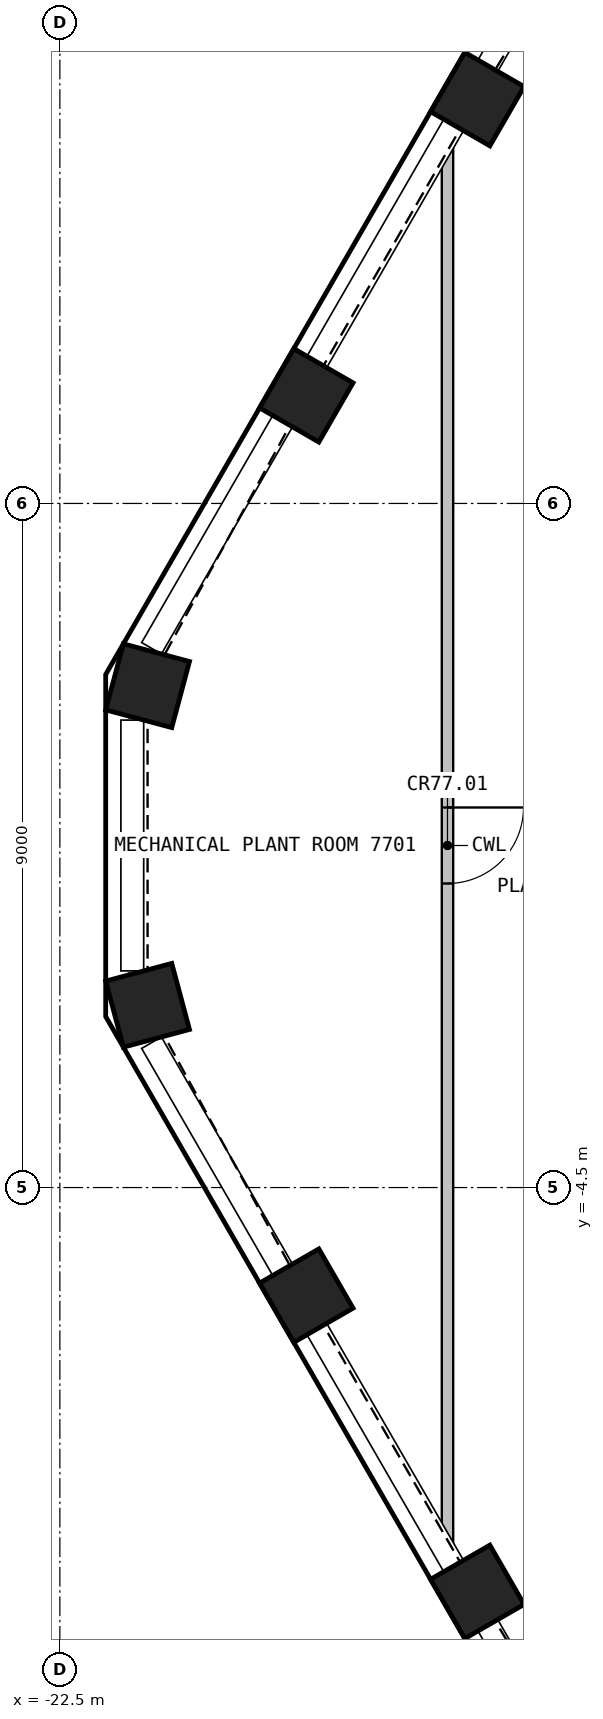
"""IFC4 building model, lengths in metres.
Left out: names, types, materials, properties, quantities, classifications, styles, units other than length and angle.
Written with IfcOpenShell. Run it as: python <this file> out.ifc"""

import sys

from ifc_helpers import new_model, si_unit, direction, frame, frame_2d, origin, origin_2d, place, context, subcontext, project, spatial, polyline, rectangle, outline, extrude, element, fill, save


model = new_model("IFC4")
c1 = context("Model", 3, precision=1e-05, world=origin(), true_north=direction((0.0, 1.0)))
c2 = subcontext(c1, "Body", "Model", "MODEL_VIEW")
j1 = project(units=[si_unit("LENGTHUNIT", "METRE"), si_unit("PLANEANGLEUNIT", "RADIAN")], contexts=[c1])
p1 = place(None, origin())
s1 = spatial("IfcSite", under=j1, at=p1, CompositionType="ELEMENT")
p2 = place(p1, origin())
s2 = spatial("IfcBuilding", under=s1, at=p2, CompositionType="ELEMENT")
p3 = place(p2, frame((0.0, 0.0, 309.9)))
s3 = spatial("IfcBuildingStorey", under=s2, at=p3, CompositionType="ELEMENT", Elevation=309.9)
for number, where, z_axis, x_axis in (
    (1, (-17.007, 9.819, 0.0), (0.0, 0.0, 1.0), (-0.5, -0.866, 0.0)),
    (2, (-19.257, 5.922, 0.0), (0.0, 0.0, 1.0), (-0.5, -0.866, 0.0)),
    (3, (-21.346, 2.102, 0.0), (0.0, 0.0, 1.0), (-0.259, -0.966, 0.0)),
    (4, (-21.346, -2.102, 0.0), (0.0, 0.0, 1.0), (0.259, -0.966, 0.0)),
    (5, (-19.257, -5.922, 0.0), (0.0, 0.0, 1.0), (0.5, -0.866, 0.0)),
    (6, (-17.007, -9.819, 0.0), (0.0, 0.0, 1.0), (0.5, -0.866, 0.0)),
):
    element("IfcColumn", number, at=place(p3, frame(where, z_axis=z_axis, x_axis=x_axis)), inside=s3, PredefinedType="COLUMN", context=c2, shape_type="SweptSolid", body=[
        extrude(rectangle(XDim=0.9, YDim=0.9, at=origin_2d()), origin(), (0.0, 0.0, 1.0), 8.55),
    ])
p4 = place(p3, origin())
e7 = element("IfcWall", 7, at=p4, inside=s3, PredefinedType="PARAPET", context=c2, shape_type="SweptSolid", body=[
    extrude(outline(polyline([(-21.897, 13.941), (-24.147, 10.044), (-23.931, 9.919), (-21.681, 13.816), (-21.897, 13.941)])), origin(), (0.0, 0.0, 1.0), 1.1),
])
p5 = place(p3, origin())
e8 = element("IfcWall", 8, at=p5, inside=s3, PredefinedType="PARAPET", context=c2, shape_type="SweptSolid", body=[
    extrude(outline(polyline([(-24.147, -10.044), (-21.897, -13.941), (-21.681, -13.816), (-23.931, -9.919), (-24.147, -10.044)])), origin(), (0.0, 0.0, 1.0), 1.1),
])
p6 = place(p3, frame((-17.4, 9.439, 0.0), z_axis=(0.0, 0.0, 1.0), x_axis=(0.0, -1.0, 0.0)))
e9 = element("IfcWall", 9, at=p6, inside=s3, PredefinedType="PARTITIONING", context=c2, shape_type="SweptSolid", body=[
    extrude(rectangle(XDim=18.878, YDim=0.15, at=frame_2d((9.439, 0.0))), origin(), (0.0, 0.0, 1.0), 8.55),
])
p7 = place(p6, frame((8.939, 0.0, 0.0)))
e10 = element("IfcOpeningElement", 10, at=p7, cuts=e9, PredefinedType="OPENING", context=c2, shape_type="SweptSolid", body=[
    extrude(rectangle(XDim=1.0, YDim=2.1, at=frame_2d((0.5, 1.05))), frame((0.0, 0.085, 0.0), z_axis=(0.0, -1.0, 0.0), x_axis=(1.0, 0.0, 0.0)), (0.0, 0.0, 1.0), 0.17),
])
p8 = place(p7, origin())
e11 = element("IfcDoor", 11, at=p8, inside=s3, OperationType="SINGLE_SWING_LEFT", PredefinedType="DOOR", context=c2, shape_type="SweptSolid", body=[
    extrude(rectangle(XDim=1.0, YDim=2.1, at=frame_2d((0.5, 1.05))), frame((0.0, 0.025, 0.0), z_axis=(0.0, -1.0, 0.0), x_axis=(1.0, 0.0, 0.0)), (0.0, 0.0, 1.0), 0.05),
])
fill(e10, e11)
save(model, sys.argv[1])
